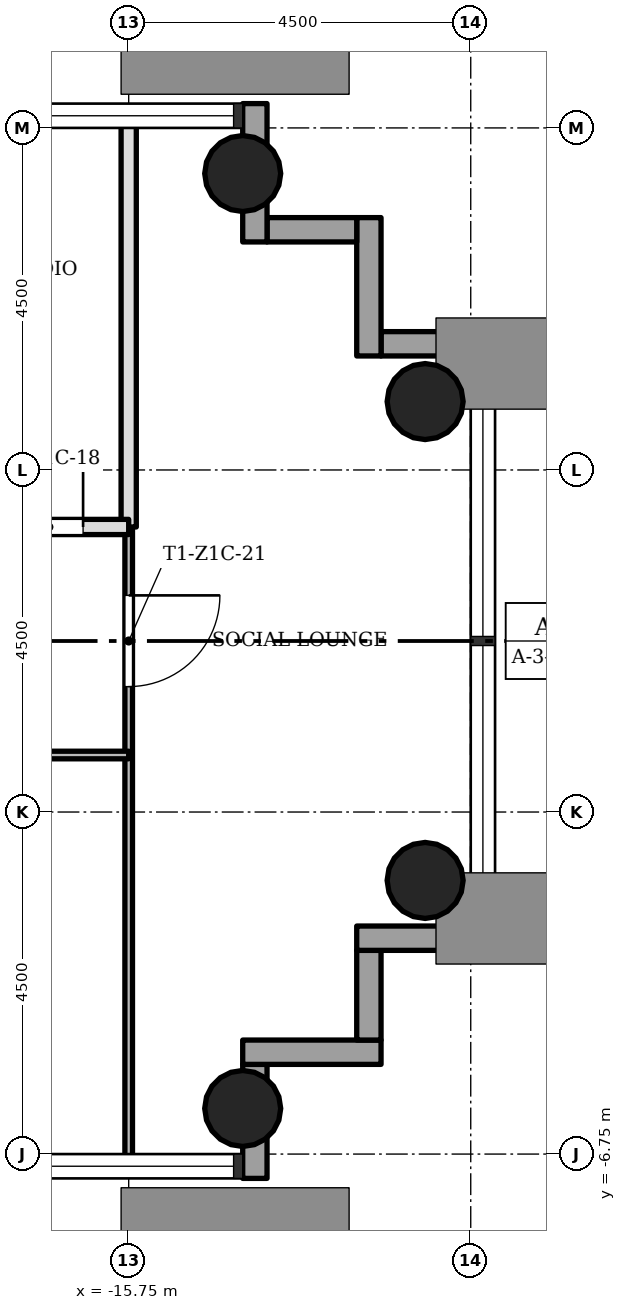
"""IFC4 building model, lengths in metres.
Left out: names, types, materials, properties, quantities, classifications, styles, units other than length and angle.
Written with IfcOpenShell. Run it as: python <this file> out.ifc"""

import sys

from ifc_helpers import new_model, si_unit, direction, frame, frame_2d, origin, origin_2d, place, context, subcontext, project, spatial, rectangle, hollow_circle, extrude, element, fill, save


model = new_model("IFC4")
c1 = context("Model", 3, precision=1e-05, world=origin(), true_north=direction((0.0, 1.0)))
c2 = subcontext(c1, "Body", "Model", "MODEL_VIEW")
j1 = project(units=[si_unit("LENGTHUNIT", "METRE"), si_unit("PLANEANGLEUNIT", "RADIAN")], contexts=[c1])
p1 = place(None, origin())
s1 = spatial("IfcSite", under=j1, at=p1, CompositionType="ELEMENT")
p2 = place(p1, origin())
s2 = spatial("IfcBuilding", under=s1, at=p2, CompositionType="ELEMENT")
p3 = place(p2, frame((0.0, 0.0, 44.9)))
s3 = spatial("IfcBuildingStorey", under=s2, at=p3, CompositionType="ELEMENT", Elevation=44.9)
for number, where, z_axis, x_axis in (
    (1, (-14.25, -6.15, 0.0), (0.0, 0.0, 1.0), (1.0, 0.0, 0.0)),
    (2, (-14.25, 6.15, 0.0), (0.0, 0.0, 1.0), (1.0, 0.0, 0.0)),
    (3, (-11.85, -3.15, 0.0), (0.0, 0.0, 1.0), (1.0, 0.0, 0.0)),
    (4, (-11.85, 3.15, 0.0), (0.0, 0.0, 1.0), (1.0, 0.0, 0.0)),
):
    element("IfcColumn", number, at=place(p3, frame(where, z_axis=z_axis, x_axis=x_axis)), inside=s3, PredefinedType="COLUMN", context=c2, shape_type="SweptSolid", body=[
        extrude(hollow_circle(Radius=0.5, WallThickness=0.036, at=origin_2d()), origin(), (0.0, 0.0, 1.0), 3.4),
    ])
p4 = place(p3, frame((-14.09, -7.07, -0.3), z_axis=(0.0, 0.0, 1.0), x_axis=(0.0, 1.0, 0.0)))
e5 = element("IfcWall", 5, at=p4, inside=s3, PredefinedType="STANDARD", context=c2, shape_type="SweptSolid", body=[
    extrude(rectangle(XDim=1.5, YDim=0.32, at=frame_2d((0.75, 0.0))), origin(), (0.0, 0.0, 1.0), 3.4),
])
p5 = place(p3, frame((-14.25, -5.41, -0.3), z_axis=(0.0, 0.0, 1.0), x_axis=(1.0, 0.0, 0.0)))
e6 = element("IfcWall", 6, at=p5, inside=s3, PredefinedType="STANDARD", context=c2, shape_type="SweptSolid", body=[
    extrude(rectangle(XDim=1.82, YDim=0.32, at=frame_2d((0.91, 0.0))), origin(), (0.0, 0.0, 1.0), 3.4),
])
p6 = place(p3, frame((-12.59, -5.25, -0.3), z_axis=(0.0, 0.0, 1.0), x_axis=(0.0, 1.0, 0.0)))
e7 = element("IfcWall", 7, at=p6, inside=s3, PredefinedType="STANDARD", context=c2, shape_type="SweptSolid", body=[
    extrude(rectangle(XDim=1.18, YDim=0.32, at=frame_2d((0.59, 0.0))), origin(), (0.0, 0.0, 1.0), 3.4),
])
p7 = place(p3, frame((-12.75, -3.91, -0.3), z_axis=(0.0, 0.0, 1.0), x_axis=(1.0, 0.0, 0.0)))
e8 = element("IfcWall", 8, at=p7, inside=s3, PredefinedType="STANDARD", context=c2, shape_type="SweptSolid", body=[
    extrude(rectangle(XDim=1.82, YDim=0.32, at=frame_2d((0.91, 0.0))), origin(), (0.0, 0.0, 1.0), 3.4),
])
p8 = place(p3, frame((-10.93, 3.91, -0.3), z_axis=(0.0, 0.0, 1.0), x_axis=(-1.0, 0.0, 0.0)))
e9 = element("IfcWall", 9, at=p8, inside=s3, PredefinedType="STANDARD", context=c2, shape_type="SweptSolid", body=[
    extrude(rectangle(XDim=1.5, YDim=0.32, at=frame_2d((0.75, 0.0))), origin(), (0.0, 0.0, 1.0), 3.4),
])
p9 = place(p3, frame((-12.59, 3.75, -0.3), z_axis=(0.0, 0.0, 1.0), x_axis=(0.0, 1.0, 0.0)))
e10 = element("IfcWall", 10, at=p9, inside=s3, PredefinedType="STANDARD", context=c2, shape_type="SweptSolid", body=[
    extrude(rectangle(XDim=1.82, YDim=0.32, at=frame_2d((0.91, 0.0))), origin(), (0.0, 0.0, 1.0), 3.4),
])
p10 = place(p3, frame((-12.75, 5.41, -0.3), z_axis=(0.0, 0.0, 1.0), x_axis=(-1.0, 0.0, 0.0)))
e11 = element("IfcWall", 11, at=p10, inside=s3, PredefinedType="STANDARD", context=c2, shape_type="SweptSolid", body=[
    extrude(rectangle(XDim=1.18, YDim=0.32, at=frame_2d((0.59, 0.0))), origin(), (0.0, 0.0, 1.0), 3.4),
])
p11 = place(p3, frame((-14.09, 5.25, -0.3), z_axis=(0.0, 0.0, 1.0), x_axis=(0.0, 1.0, 0.0)))
e12 = element("IfcWall", 12, at=p11, inside=s3, PredefinedType="STANDARD", context=c2, shape_type="SweptSolid", body=[
    extrude(rectangle(XDim=1.82, YDim=0.32, at=frame_2d((0.91, 0.0))), origin(), (0.0, 0.0, 1.0), 3.4),
])
p12 = place(p3, frame((-15.75, -6.85, 0.0), z_axis=(0.0, 0.0, 1.0), x_axis=(0.0, 1.0, 0.0)))
e13 = element("IfcWall", 13, at=p12, inside=s3, PredefinedType="PARTITIONING", context=c2, shape_type="SweptSolid", body=[
    extrude(rectangle(XDim=8.35, YDim=0.1, at=frame_2d((4.175, 0.0))), origin(), (0.0, 0.0, 1.0), 3.0),
])
p13 = place(p12, frame((6.25, 0.0, 0.0)))
e14 = element("IfcOpeningElement", 14, at=p13, cuts=e13, PredefinedType="OPENING", context=c2, shape_type="SweptSolid", body=[
    extrude(rectangle(XDim=1.2, YDim=2.1, at=frame_2d((0.6, 1.05))), frame((0.0, 0.06, 0.0), z_axis=(0.0, -1.0, 0.0), x_axis=(1.0, 0.0, 0.0)), (0.0, 0.0, 1.0), 0.12),
])
p14 = place(p3, frame((-15.75, 1.5, 0.0), z_axis=(0.0, 0.0, 1.0), x_axis=(0.0, 1.0, 0.0)))
e15 = element("IfcWall", 15, at=p14, inside=s3, PredefinedType="SOLIDWALL", context=c2, shape_type="SweptSolid", body=[
    extrude(rectangle(XDim=5.35, YDim=0.2, at=frame_2d((2.675, 0.0))), origin(), (0.0, 0.0, 1.0), 3.0),
])
p15 = place(p3, frame((-20.25, -1.5, 0.0), z_axis=(0.0, 0.0, 1.0), x_axis=(1.0, 0.0, 0.0)))
e16 = element("IfcWall", 16, at=p15, inside=s3, PredefinedType="PARTITIONING", context=c2, shape_type="SweptSolid", body=[
    extrude(rectangle(XDim=4.5, YDim=0.1, at=frame_2d((2.25, 0.0))), origin(), (0.0, 0.0, 1.0), 3.0),
])
p16 = place(p15, frame((1.8, 0.0, 0.0)))
e17 = element("IfcOpeningElement", 17, at=p16, cuts=e16, PredefinedType="OPENING", context=c2, shape_type="SweptSolid", body=[
    extrude(rectangle(XDim=0.9, YDim=2.1, at=frame_2d((0.45, 1.05))), frame((0.0, 0.06, 0.0), z_axis=(0.0, -1.0, 0.0), x_axis=(1.0, 0.0, 0.0)), (0.0, 0.0, 1.0), 0.12),
])
p17 = place(p3, frame((-20.25, 1.5, 0.0), z_axis=(0.0, 0.0, 1.0), x_axis=(1.0, 0.0, 0.0)))
e18 = element("IfcWall", 18, at=p17, inside=s3, PredefinedType="SOLIDWALL", context=c2, shape_type="SweptSolid", body=[
    extrude(rectangle(XDim=4.5, YDim=0.2, at=frame_2d((2.25, 0.0))), origin(), (0.0, 0.0, 1.0), 3.0),
])
p18 = place(p17, frame((3.0, 0.0, 0.0)))
e19 = element("IfcOpeningElement", 19, at=p18, cuts=e18, PredefinedType="OPENING", context=c2, shape_type="SweptSolid", body=[
    extrude(rectangle(XDim=0.9, YDim=2.1, at=frame_2d((0.45, 1.05))), frame((0.0, 0.11, 0.0), z_axis=(0.0, -1.0, 0.0), x_axis=(1.0, 0.0, 0.0)), (0.0, 0.0, 1.0), 0.22),
])
p19 = place(p18, origin())
e20 = element("IfcDoor", 20, at=p19, inside=s3, OperationType="SINGLE_SWING_LEFT", PredefinedType="DOOR", context=c2, shape_type="SweptSolid", body=[
    extrude(rectangle(XDim=0.9, YDim=2.1, at=frame_2d((0.45, 1.05))), frame((0.0, 0.025, 0.0), z_axis=(0.0, -1.0, 0.0), x_axis=(1.0, 0.0, 0.0)), (0.0, 0.0, 1.0), 0.05),
])
fill(e19, e20)
p20 = place(p13, origin())
e21 = element("IfcDoor", 21, at=p20, inside=s3, OperationType="SINGLE_SWING_RIGHT", PredefinedType="DOOR", context=c2, shape_type="SweptSolid", body=[
    extrude(rectangle(XDim=1.2, YDim=2.1, at=frame_2d((0.6, 1.05))), frame((0.0, 0.025, 0.0), z_axis=(0.0, -1.0, 0.0), x_axis=(1.0, 0.0, 0.0)), (0.0, 0.0, 1.0), 0.05),
])
fill(e14, e21)
save(model, sys.argv[1])
